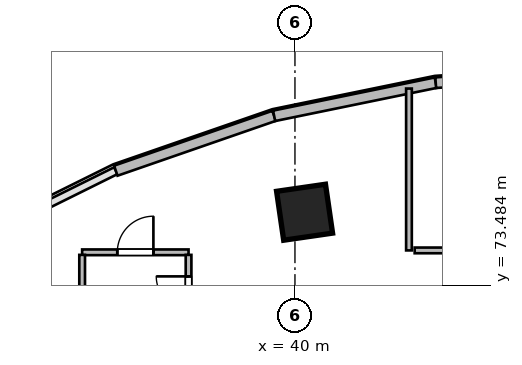
"""IFC4 building model, lengths in metres.
Left out: names, types, materials, properties, quantities, classifications, styles, units other than length and angle.
Written with IfcOpenShell. Run it as: python <this file> out.ifc"""

import sys

from ifc_helpers import new_model, si_unit, direction, frame, frame_2d, origin, origin_2d, place, context, subcontext, project, spatial, rectangle, extrude, source, transform, mapped, element, fill, save


model = new_model("IFC4")
c1 = context("Model", 3, precision=1e-05, world=origin(), true_north=direction((0.0, 1.0)))
c2 = subcontext(c1, "Body", "Model", "MODEL_VIEW")
j1 = project(units=[si_unit("LENGTHUNIT", "METRE"), si_unit("PLANEANGLEUNIT", "RADIAN")], contexts=[c1])
p1 = place(None, origin())
s1 = spatial("IfcSite", under=j1, at=p1, CompositionType="ELEMENT")
p2 = place(p1, origin())
s2 = spatial("IfcBuilding", under=s1, at=p2, CompositionType="ELEMENT")
p3 = place(p2, frame((0.0, 0.0, 103.8)))
s3 = spatial("IfcBuildingStorey", under=s2, at=p3, CompositionType="ELEMENT", Elevation=103.8)
m1 = source(origin(), c2, "Body", "SweptSolid", [
    extrude(rectangle(XDim=1.3, YDim=1.3, at=origin_2d()), origin(), (0.0, 0.0, 1.0), 3.9),
])
p4 = place(p3, frame((40.253, 75.404, 0.0), z_axis=(0.0, 0.0, 1.0), x_axis=(-0.143492621991, 0.98965138682, 0.0)))
e1 = element("IfcColumn", 1, at=p4, inside=s3, PredefinedType="COLUMN", context=c2, shape_type="MappedRepresentation", body=[
    mapped(m1, transform((0.0, 0.0, 0.0), scale=1.0)),
])
m2 = source(origin(), c2, "Body", "SweptSolid", [
    extrude(rectangle(XDim=4.409, YDim=0.28, at=frame_2d((2.205, 0.0))), origin(), (0.0, 0.0, 1.0), 3.65),
])
p5 = place(p3, frame((35.286, 76.497, 0.0), z_axis=(0.0, 0.0, 1.0), x_axis=(0.944879374121, 0.327418643881, 0.0)))
e2 = element("IfcWall", 2, at=p5, inside=s3, PredefinedType="SOLIDWALL", context=c2, shape_type="MappedRepresentation", body=[
    mapped(m2, transform((0.0, 0.0, 0.0), scale=1.0)),
])
m3 = source(origin(), c2, "Body", "SweptSolid", [
    extrude(rectangle(XDim=4.341, YDim=0.28, at=frame_2d((2.17, 0.0))), origin(), (0.0, 0.0, 1.0), 3.65),
])
p6 = place(p3, frame((39.452, 77.941, 0.0), z_axis=(0.0, 0.0, 1.0), x_axis=(0.979612918634, 0.20089432457, 0.0)))
e3 = element("IfcWall", 3, at=p6, inside=s3, PredefinedType="SOLIDWALL", context=c2, shape_type="MappedRepresentation", body=[
    mapped(m3, transform((0.0, 0.0, 0.0), scale=1.0)),
])
m4 = source(origin(), c2, "Body", "SweptSolid", [
    extrude(rectangle(XDim=4.306, YDim=0.28, at=frame_2d((2.153, 0.0))), origin(), (0.0, 0.0, 1.0), 3.65),
])
p7 = place(p3, frame((43.704, 78.813, 0.0), z_axis=(0.0, 0.0, 1.0), x_axis=(0.997705679258, 0.067700646797, 0.0)))
e4 = element("IfcWall", 4, at=p7, inside=s3, PredefinedType="SOLIDWALL", context=c2, shape_type="MappedRepresentation", body=[
    mapped(m4, transform((0.0, 0.0, 0.0), scale=1.0)),
])
m5 = source(origin(), c2, "Body", "SweptSolid", [
    extrude(rectangle(XDim=2.8, YDim=0.15, at=frame_2d((1.4, 0.0))), origin(), (0.0, 0.0, 1.0), 3.65),
])
p8 = place(p3, frame((34.4, 74.35, 0.0), z_axis=(0.0, 0.0, 1.0), x_axis=(1.0, 0.0, 0.0)))
e5 = element("IfcWall", 5, at=p8, inside=s3, PredefinedType="PARTITIONING", context=c2, shape_type="MappedRepresentation", body=[
    mapped(m5, transform((0.0, 0.0, 0.0), scale=1.0)),
])
p9 = place(p8, frame((0.925, 0.0, 0.0)))
e6 = element("IfcOpeningElement", 6, at=p9, cuts=e5, PredefinedType="OPENING", context=c2, shape_type="SweptSolid", body=[
    extrude(rectangle(XDim=0.95, YDim=2.1, at=frame_2d((0.475, 1.05))), frame((0.0, 0.085, 0.0), z_axis=(0.0, -1.0, 0.0), x_axis=(1.0, 0.0, 0.0)), (0.0, 0.0, 1.0), 0.17),
])
m6 = source(origin(), c2, "Body", "SweptSolid", [
    extrude(rectangle(XDim=1.995, YDim=0.15, at=frame_2d((0.998, 0.0))), origin(), (0.0, 0.0, 1.0), 3.65),
])
p10 = place(p3, frame((34.4, 72.288, 0.0), z_axis=(0.0, 0.0, 1.0), x_axis=(0.0, 1.0, 0.0)))
e7 = element("IfcWall", 7, at=p10, inside=s3, PredefinedType="PARTITIONING", context=c2, shape_type="MappedRepresentation", body=[
    mapped(m6, transform((0.0, 0.0, 0.0), scale=1.0)),
])
m7 = source(origin(), c2, "Body", "SweptSolid", [
    extrude(rectangle(XDim=1.982, YDim=0.15, at=frame_2d((0.991, 0.0))), origin(), (0.0, 0.0, 1.0), 3.65),
])
p11 = place(p3, frame((37.2, 72.3, 0.0), z_axis=(0.0, 0.0, 1.0), x_axis=(0.0, 1.0, 0.0)))
e8 = element("IfcWall", 8, at=p11, inside=s3, PredefinedType="PARTITIONING", context=c2, shape_type="MappedRepresentation", body=[
    mapped(m7, transform((0.0, 0.0, 0.0), scale=1.0)),
])
p12 = place(p11, frame((0.566, 0.0, 0.0)))
e9 = element("IfcOpeningElement", 9, at=p12, cuts=e8, PredefinedType="OPENING", context=c2, shape_type="SweptSolid", body=[
    extrude(rectangle(XDim=0.85, YDim=2.1, at=frame_2d((0.425, 1.05))), frame((0.0, 0.085, 0.0), z_axis=(0.0, -1.0, 0.0), x_axis=(1.0, 0.0, 0.0)), (0.0, 0.0, 1.0), 0.17),
])
m8 = source(origin(), c2, "Body", "SweptSolid", [
    extrude(rectangle(XDim=4.259, YDim=0.15, at=frame_2d((2.129, 0.0))), origin(), (0.0, 0.0, 1.0), 3.65),
])
p13 = place(p3, frame((43.0, 74.4, 0.0), z_axis=(0.0, 0.0, 1.0), x_axis=(0.0, 1.0, 0.0)))
e10 = element("IfcWall", 10, at=p13, inside=s3, PredefinedType="PARTITIONING", context=c2, shape_type="MappedRepresentation", body=[
    mapped(m8, transform((0.0, 0.0, 0.0), scale=1.0)),
])
m9 = source(origin(), c2, "Body", "SweptSolid", [
    extrude(rectangle(XDim=9.7, YDim=0.15, at=frame_2d((4.85, 0.0))), origin(), (0.0, 0.0, 1.0), 3.65),
])
p14 = place(p3, frame((43.15, 74.4, 0.0), z_axis=(0.0, 0.0, 1.0), x_axis=(1.0, 0.0, 0.0)))
e11 = element("IfcWall", 11, at=p14, inside=s3, PredefinedType="PARTITIONING", context=c2, shape_type="MappedRepresentation", body=[
    mapped(m9, transform((0.0, 0.0, 0.0), scale=1.0)),
])
p15 = place(p14, frame((4.375, 0.0, 0.0)))
e12 = element("IfcOpeningElement", 12, at=p15, cuts=e11, PredefinedType="OPENING", context=c2, shape_type="SweptSolid", body=[
    extrude(rectangle(XDim=0.95, YDim=2.1, at=frame_2d((0.475, 1.05))), frame((0.0, 0.085, 0.0), z_axis=(0.0, -1.0, 0.0), x_axis=(1.0, 0.0, 0.0)), (0.0, 0.0, 1.0), 0.17),
])
m10 = source(origin(), c2, "Body", "SweptSolid", [
    extrude(rectangle(XDim=0.85, YDim=2.1, at=frame_2d((0.425, 1.05))), frame((0.0, 0.025, 0.0), z_axis=(0.0, -1.0, 0.0), x_axis=(1.0, 0.0, 0.0)), (0.0, 0.0, 1.0), 0.05),
])
p16 = place(p12, origin())
e13 = element("IfcDoor", 13, at=p16, inside=s3, OperationType="SINGLE_SWING_RIGHT", PredefinedType="DOOR", context=c2, shape_type="MappedRepresentation", body=[
    mapped(m10, transform((0.0, 0.0, 0.0), scale=1.0)),
])
fill(e9, e13)
m11 = source(origin(), c2, "Body", "SweptSolid", [
    extrude(rectangle(XDim=0.95, YDim=2.1, at=frame_2d((0.475, 1.05))), frame((0.0, 0.025, 0.0), z_axis=(0.0, -1.0, 0.0), x_axis=(1.0, 0.0, 0.0)), (0.0, 0.0, 1.0), 0.05),
])
p17 = place(p9, origin())
e14 = element("IfcDoor", 14, at=p17, inside=s3, OperationType="SINGLE_SWING_RIGHT", PredefinedType="DOOR", context=c2, shape_type="MappedRepresentation", body=[
    mapped(m11, transform((0.0, 0.0, 0.0), scale=1.0)),
])
fill(e6, e14)
save(model, sys.argv[1])
